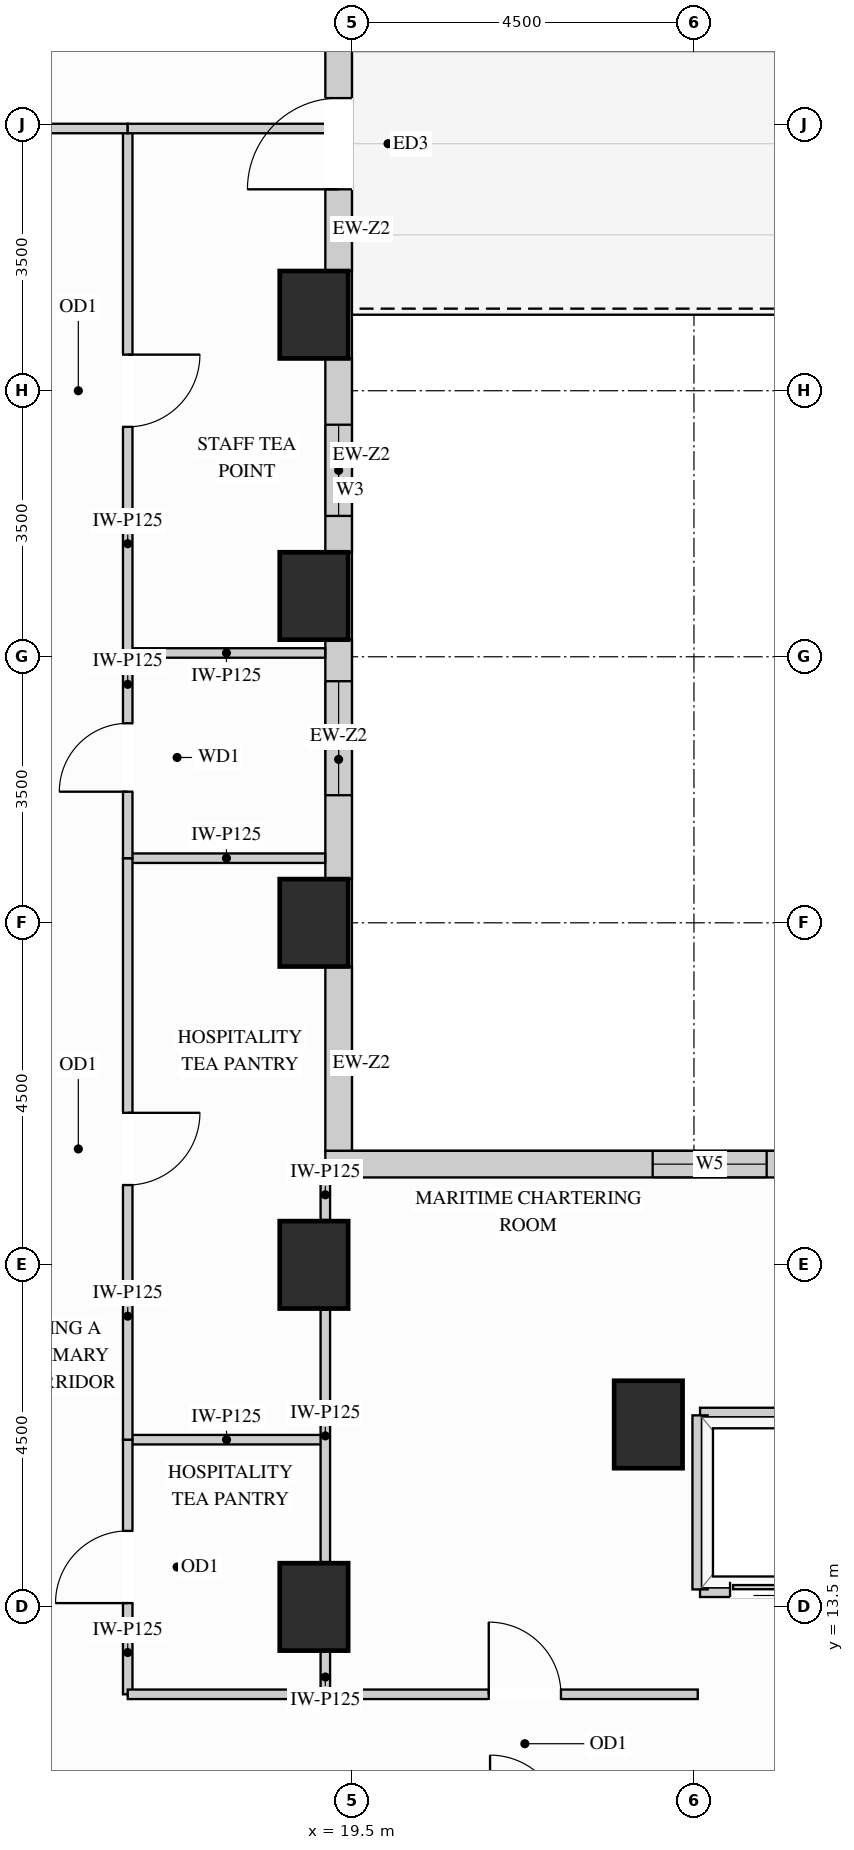
"""IFC4 building model, lengths in metres.
Left out: names, types, materials, properties, quantities, classifications, styles, units other than length and angle.
Written with IfcOpenShell. Run it as: python <this file> out.ifc"""

import sys

from ifc_helpers import new_model, si_unit, direction, frame, frame_2d, origin, origin_2d, place, context, subcontext, project, spatial, rectangle, extrude, source, transform, mapped, element, fill, save


model = new_model("IFC4")
c1 = context("Model", 3, precision=1e-05, world=origin(), true_north=direction((0.0, 1.0)))
c2 = subcontext(c1, "Body", "Model", "MODEL_VIEW")
j1 = project(units=[si_unit("LENGTHUNIT", "METRE"), si_unit("PLANEANGLEUNIT", "RADIAN")], contexts=[c1])
p1 = place(None, origin())
s1 = spatial("IfcSite", under=j1, at=p1, CompositionType="ELEMENT")
p2 = place(p1, origin())
s2 = spatial("IfcBuilding", under=s1, at=p2, CompositionType="ELEMENT")
p3 = place(p2, frame((0.0, 0.0, 99.0)))
s3 = spatial("IfcBuildingStorey", under=s2, at=p3, CompositionType="ELEMENT", Elevation=99.0)
m1 = source(origin(), c2, "Body", "SweptSolid", [
    extrude(rectangle(XDim=0.9, YDim=1.15, at=origin_2d()), origin(), (0.0, 0.0, 1.0), 3.38),
])
for number, where, z_axis, x_axis in (
    (1, (19.0, 13.5, 0.0), (0.0, 0.0, 1.0), (1.0, 0.0, 0.0)),
    (2, (19.0, 18.0, 0.0), (0.0, 0.0, 1.0), (1.0, 0.0, 0.0)),
    (3, (19.0, 22.5, 0.0), (0.0, 0.0, 1.0), (1.0, 0.0, 0.0)),
    (4, (19.0, 26.8, 0.0), (0.0, 0.0, 1.0), (1.0, 0.0, 0.0)),
    (5, (19.0, 30.5, 0.0), (0.0, 0.0, 1.0), (1.0, 0.0, 0.0)),
    (6, (23.4, 15.9, 0.0), (0.0, 0.0, 1.0), (1.0, 0.0, 0.0)),
):
    element("IfcColumn", number, at=place(p3, frame(where, z_axis=z_axis, x_axis=x_axis)), inside=s3, PredefinedType="COLUMN", context=c2, shape_type="MappedRepresentation", body=[
        mapped(m1, transform((0.0, 0.0, 0.0), x_axis=(1.0, 0.0, 0.0), y_axis=(0.0, 1.0, 0.0), z_axis=(0.0, 0.0, 1.0))),
    ])
m2 = source(origin(), c2, "Body", "SweptSolid", [
    extrude(rectangle(XDim=2.429, YDim=0.35, at=frame_2d((1.214, 0.0))), origin(), (0.0, 0.0, 1.0), 2.519),
])
p4 = place(p3, frame((19.325, 19.498, 0.0), z_axis=(0.0, 0.0, 1.0), x_axis=(0.0, 1.0, 0.0)))
e7 = element("IfcWall", 7, at=p4, inside=s3, PredefinedType="SOLIDWALL", context=c2, shape_type="MappedRepresentation", body=[
    mapped(m2, transform((0.0, 0.0, 0.0), x_axis=(1.0, 0.0, 0.0), y_axis=(0.0, 1.0, 0.0), z_axis=(0.0, 0.0, 1.0))),
])
p5 = place(p3, frame((19.325, 23.073, 0.0), z_axis=(0.0, 0.0, 1.0), x_axis=(0.0, 1.0, 0.0)))
e8 = element("IfcWall", 8, at=p5, inside=s3, PredefinedType="SOLIDWALL", context=c2, shape_type="SweptSolid", body=[
    extrude(rectangle(XDim=3.154, YDim=0.35, at=frame_2d((1.577, 0.0))), origin(), (0.0, 0.0, 1.0), 2.519),
])
p6 = place(p5, frame((1.105, 0.0, 0.78)))
e9 = element("IfcOpeningElement", 9, at=p6, cuts=e8, PredefinedType="OPENING", context=c2, shape_type="SweptSolid", body=[
    extrude(rectangle(XDim=1.5, YDim=1.559, at=frame_2d((0.75, 0.78))), frame((0.0, 0.185, 0.0), z_axis=(0.0, -1.0, 0.0), x_axis=(1.0, 0.0, 0.0)), (0.0, 0.0, 1.0), 0.37),
])
p7 = place(p3, frame((19.325, 27.373, 0.0), z_axis=(0.0, 0.0, 1.0), x_axis=(0.0, 1.0, 0.0)))
e10 = element("IfcWall", 10, at=p7, inside=s3, PredefinedType="SOLIDWALL", context=c2, shape_type="SweptSolid", body=[
    extrude(rectangle(XDim=2.554, YDim=0.35, at=frame_2d((1.277, 0.0))), origin(), (0.0, 0.0, 1.0), 2.519),
])
p8 = place(p7, frame((0.48, 0.0, 0.78)))
e11 = element("IfcOpeningElement", 11, at=p8, cuts=e10, PredefinedType="OPENING", context=c2, shape_type="SweptSolid", body=[
    extrude(rectangle(XDim=1.2, YDim=1.559, at=frame_2d((0.6, 0.78))), frame((0.0, 0.185, 0.0), z_axis=(0.0, -1.0, 0.0), x_axis=(1.0, 0.0, 0.0)), (0.0, 0.0, 1.0), 0.37),
])
p9 = place(p3, frame((19.325, 31.073, 0.0), z_axis=(0.0, 0.0, 1.0), x_axis=(0.0, 1.0, 0.0)))
e12 = element("IfcWall", 12, at=p9, inside=s3, PredefinedType="SOLIDWALL", context=c2, shape_type="SweptSolid", body=[
    extrude(rectangle(XDim=3.354, YDim=0.35, at=frame_2d((1.677, 0.0))), origin(), (0.0, 0.0, 1.0), 2.519),
])
p10 = place(p9, frame((1.077, 0.0, 0.0)))
e13 = element("IfcOpeningElement", 13, at=p10, cuts=e12, PredefinedType="OPENING", context=c2, shape_type="SweptSolid", body=[
    extrude(rectangle(XDim=1.2, YDim=2.15, at=frame_2d((0.6, 1.075))), frame((0.0, 0.185, 0.0), z_axis=(0.0, -1.0, 0.0), x_axis=(1.0, 0.0, 0.0)), (0.0, 0.0, 1.0), 0.37),
])
p11 = place(p3, frame((34.75, 19.325, 0.0), z_axis=(0.0, 0.0, 1.0), x_axis=(-1.0, 0.0, 0.0)))
e14 = element("IfcWall", 14, at=p11, inside=s3, PredefinedType="SOLIDWALL", context=c2, shape_type="SweptSolid", body=[
    extrude(rectangle(XDim=15.6, YDim=0.35, at=frame_2d((7.8, 0.0))), origin(), (0.0, 0.0, 1.0), 3.365),
])
p12 = place(p11, frame((4.307, 0.0, 0.78)))
e15 = element("IfcOpeningElement", 15, at=p12, cuts=e14, PredefinedType="OPENING", context=c2, shape_type="SweptSolid", body=[
    extrude(rectangle(XDim=1.5, YDim=2.0, at=frame_2d((0.75, 1.0))), frame((0.0, 0.185, 0.0), z_axis=(0.0, -1.0, 0.0), x_axis=(1.0, 0.0, 0.0)), (0.0, 0.0, 1.0), 0.37),
])
p13 = place(p11, frame((9.793, 0.0, 0.78)))
e16 = element("IfcOpeningElement", 16, at=p13, cuts=e14, PredefinedType="OPENING", context=c2, shape_type="SweptSolid", body=[
    extrude(rectangle(XDim=1.5, YDim=2.0, at=frame_2d((0.75, 1.0))), frame((0.0, 0.185, 0.0), z_axis=(0.0, -1.0, 0.0), x_axis=(1.0, 0.0, 0.0)), (0.0, 0.0, 1.0), 0.37),
])
m3 = source(origin(), c2, "Body", "SweptSolid", [
    extrude(rectangle(XDim=2.6, YDim=0.125, at=frame_2d((1.3, 0.0))), origin(), (0.0, 0.0, 1.0), 3.365),
])
p14 = place(p3, frame((16.55, 15.7, 0.0), z_axis=(0.0, 0.0, 1.0), x_axis=(1.0, 0.0, 0.0)))
e17 = element("IfcWall", 17, at=p14, inside=s3, PredefinedType="PARTITIONING", context=c2, shape_type="MappedRepresentation", body=[
    mapped(m3, transform((0.0, 0.0, 0.0), x_axis=(1.0, 0.0, 0.0), y_axis=(0.0, 1.0, 0.0), z_axis=(0.0, 0.0, 1.0))),
])
m4 = source(origin(), c2, "Body", "SweptSolid", [
    extrude(rectangle(XDim=2.598, YDim=0.125, at=frame_2d((1.299, 0.0))), origin(), (0.0, 0.0, 1.0), 3.365),
])
for number, where, z_axis, x_axis in (
    (18, (16.55, 23.35, 0.0), (0.0, 0.0, 1.0), (1.0, 0.0, 0.0)),
    (19, (16.55, 26.05, 0.0), (0.0, 0.0, 1.0), (1.0, 0.0, 0.0)),
):
    element("IfcWall", number, at=place(p3, frame(where, z_axis=z_axis, x_axis=x_axis)), inside=s3, PredefinedType="PARTITIONING", context=c2, shape_type="MappedRepresentation", body=[
        mapped(m4, transform((0.0, 0.0, 0.0), x_axis=(1.0, 0.0, 0.0), y_axis=(0.0, 1.0, 0.0), z_axis=(0.0, 0.0, 1.0))),
    ])
m5 = source(origin(), c2, "Body", "SweptSolid", [
    extrude(rectangle(XDim=0.56, YDim=0.125, at=frame_2d((0.28, 0.0))), origin(), (0.0, 0.0, 1.0), 2.677),
])
p15 = place(p3, frame((19.15, 12.35, 0.0), z_axis=(0.0, 0.0, 1.0), x_axis=(0.0, 1.0, 0.0)))
e20 = element("IfcWall", 20, at=p15, inside=s3, PredefinedType="PARTITIONING", context=c2, shape_type="MappedRepresentation", body=[
    mapped(m5, transform((0.0, 0.0, 0.0), x_axis=(1.0, 0.0, 0.0), y_axis=(0.0, 1.0, 0.0), z_axis=(0.0, 0.0, 1.0))),
])
m6 = source(origin(), c2, "Body", "SweptSolid", [
    extrude(rectangle(XDim=3.32, YDim=0.125, at=frame_2d((1.66, 0.0))), origin(), (0.0, 0.0, 1.0), 2.677),
])
p16 = place(p3, frame((19.15, 14.09, 0.0), z_axis=(0.0, 0.0, 1.0), x_axis=(0.0, 1.0, 0.0)))
e21 = element("IfcWall", 21, at=p16, inside=s3, PredefinedType="PARTITIONING", context=c2, shape_type="MappedRepresentation", body=[
    mapped(m6, transform((0.0, 0.0, 0.0), x_axis=(1.0, 0.0, 0.0), y_axis=(0.0, 1.0, 0.0), z_axis=(0.0, 0.0, 1.0))),
])
m7 = source(origin(), c2, "Body", "SweptSolid", [
    extrude(rectangle(XDim=0.558, YDim=0.125, at=frame_2d((0.279, 0.0))), origin(), (0.0, 0.0, 1.0), 2.519),
])
p17 = place(p3, frame((19.15, 18.59, 0.0), z_axis=(0.0, 0.0, 1.0), x_axis=(0.0, 1.0, 0.0)))
e22 = element("IfcWall", 22, at=p17, inside=s3, PredefinedType="PARTITIONING", context=c2, shape_type="MappedRepresentation", body=[
    mapped(m7, transform((0.0, 0.0, 0.0), x_axis=(1.0, 0.0, 0.0), y_axis=(0.0, 1.0, 0.0), z_axis=(0.0, 0.0, 1.0))),
])
p18 = place(p3, frame((16.55, 12.35, 0.0), z_axis=(0.0, 0.0, 1.0), x_axis=(0.0, 1.0, 0.0)))
e23 = element("IfcWall", 23, at=p18, inside=s3, PredefinedType="PARTITIONING", context=c2, shape_type="SweptSolid", body=[
    extrude(rectangle(XDim=3.35, YDim=0.125, at=frame_2d((1.675, 0.0))), origin(), (0.0, 0.0, 1.0), 3.365),
])
p19 = place(p18, frame((1.2, 0.0, 0.0)))
e24 = element("IfcOpeningElement", 24, at=p19, cuts=e23, PredefinedType="OPENING", context=c2, shape_type="SweptSolid", body=[
    extrude(rectangle(XDim=0.95, YDim=2.15, at=frame_2d((0.475, 1.075))), frame((0.0, 0.073, 0.0), z_axis=(0.0, -1.0, 0.0), x_axis=(1.0, 0.0, 0.0)), (0.0, 0.0, 1.0), 0.145),
])
p20 = place(p3, frame((16.55, 15.7, 0.0), z_axis=(0.0, 0.0, 1.0), x_axis=(0.0, 1.0, 0.0)))
e25 = element("IfcWall", 25, at=p20, inside=s3, PredefinedType="PARTITIONING", context=c2, shape_type="SweptSolid", body=[
    extrude(rectangle(XDim=7.65, YDim=0.125, at=frame_2d((3.825, 0.0))), origin(), (0.0, 0.0, 1.0), 3.365),
])
p21 = place(p20, frame((3.35, 0.0, 0.0)))
e26 = element("IfcOpeningElement", 26, at=p21, cuts=e25, PredefinedType="OPENING", context=c2, shape_type="SweptSolid", body=[
    extrude(rectangle(XDim=0.95, YDim=2.15, at=frame_2d((0.475, 1.075))), frame((0.0, 0.073, 0.0), z_axis=(0.0, -1.0, 0.0), x_axis=(1.0, 0.0, 0.0)), (0.0, 0.0, 1.0), 0.145),
])
p22 = place(p3, frame((16.55, 26.05, 0.0), z_axis=(0.0, 0.0, 1.0), x_axis=(0.0, 1.0, 0.0)))
e27 = element("IfcWall", 27, at=p22, inside=s3, PredefinedType="PARTITIONING", context=c2, shape_type="SweptSolid", body=[
    extrude(rectangle(XDim=6.9, YDim=0.125, at=frame_2d((3.45, 0.0))), origin(), (0.0, 0.0, 1.0), 3.365),
])
p23 = place(p22, frame((2.975, 0.0, 0.0)))
e28 = element("IfcOpeningElement", 28, at=p23, cuts=e27, PredefinedType="OPENING", context=c2, shape_type="SweptSolid", body=[
    extrude(rectangle(XDim=0.95, YDim=2.15, at=frame_2d((0.475, 1.075))), frame((0.0, 0.073, 0.0), z_axis=(0.0, -1.0, 0.0), x_axis=(1.0, 0.0, 0.0)), (0.0, 0.0, 1.0), 0.145),
])
p24 = place(p3, frame((16.55, 23.35, 0.0), z_axis=(0.0, 0.0, 1.0), x_axis=(0.0, 1.0, 0.0)))
e29 = element("IfcWall", 29, at=p24, inside=s3, PredefinedType="PARTITIONING", context=c2, shape_type="SweptSolid", body=[
    extrude(rectangle(XDim=2.7, YDim=0.125, at=frame_2d((1.35, 0.0))), origin(), (0.0, 0.0, 1.0), 3.365),
])
p25 = place(p24, frame((0.875, 0.0, 0.0)))
e30 = element("IfcOpeningElement", 30, at=p25, cuts=e29, PredefinedType="OPENING", context=c2, shape_type="SweptSolid", body=[
    extrude(rectangle(XDim=0.9, YDim=2.15, at=frame_2d((0.45, 1.075))), frame((0.0, 0.073, 0.0), z_axis=(0.0, -1.0, 0.0), x_axis=(1.0, 0.0, 0.0)), (0.0, 0.0, 1.0), 0.145),
])
p26 = place(p3, frame((2.45, 32.95, 0.0), z_axis=(0.0, 0.0, 1.0), x_axis=(1.0, 0.0, 0.0)))
e31 = element("IfcWall", 31, at=p26, inside=s3, PredefinedType="PARTITIONING", context=c2, shape_type="SweptSolid", body=[
    extrude(rectangle(XDim=14.1, YDim=0.125, at=frame_2d((7.05, 0.0))), origin(), (0.0, 0.0, 1.0), 3.365),
])
p27 = place(p26, frame((6.575, 0.0, 0.0)))
e32 = element("IfcOpeningElement", 32, at=p27, cuts=e31, PredefinedType="OPENING", context=c2, shape_type="SweptSolid", body=[
    extrude(rectangle(XDim=0.95, YDim=2.15, at=frame_2d((0.475, 1.075))), frame((0.0, 0.073, 0.0), z_axis=(0.0, -1.0, 0.0), x_axis=(1.0, 0.0, 0.0)), (0.0, 0.0, 1.0), 0.145),
])
p28 = place(p3, frame((16.55, 32.95, 0.0), z_axis=(0.0, 0.0, 1.0), x_axis=(1.0, 0.0, 0.0)))
e33 = element("IfcWall", 33, at=p28, inside=s3, PredefinedType="PARTITIONING", context=c2, shape_type="MappedRepresentation", body=[
    mapped(m4, transform((0.0, 0.0, 0.0), x_axis=(1.0, 0.0, 0.0), y_axis=(0.0, 1.0, 0.0), z_axis=(0.0, 0.0, 1.0))),
])
m8 = source(origin(), c2, "Body", "SweptSolid", [
    extrude(rectangle(XDim=2.95, YDim=0.125, at=frame_2d((1.475, 0.0))), origin(), (0.0, 0.0, 1.0), 3.365),
])
p29 = place(p3, frame((16.55, 12.35, 0.0), z_axis=(0.0, 0.0, 1.0), x_axis=(1.0, 0.0, 0.0)))
e34 = element("IfcWall", 34, at=p29, inside=s3, PredefinedType="PARTITIONING", context=c2, shape_type="MappedRepresentation", body=[
    mapped(m8, transform((0.0, 0.0, 0.0), x_axis=(1.0, 0.0, 0.0), y_axis=(0.0, 1.0, 0.0), z_axis=(0.0, 0.0, 1.0))),
])
p30 = place(p3, frame((19.5, 12.35, 0.0), z_axis=(0.0, 0.0, 1.0), x_axis=(1.0, 0.0, 0.0)))
e35 = element("IfcWall", 35, at=p30, inside=s3, PredefinedType="PARTITIONING", context=c2, shape_type="SweptSolid", body=[
    extrude(rectangle(XDim=4.55, YDim=0.125, at=frame_2d((2.275, 0.0))), origin(), (0.0, 0.0, 1.0), 3.365),
])
p31 = place(p30, frame((1.8, 0.0, 0.0)))
e36 = element("IfcOpeningElement", 36, at=p31, cuts=e35, PredefinedType="OPENING", context=c2, shape_type="SweptSolid", body=[
    extrude(rectangle(XDim=0.95, YDim=2.15, at=frame_2d((0.475, 1.075))), frame((0.0, 0.073, 0.0), z_axis=(0.0, -1.0, 0.0), x_axis=(1.0, 0.0, 0.0)), (0.0, 0.0, 1.0), 0.145),
])
m9 = source(origin(), c2, "Body", "SweptSolid", [
    extrude(rectangle(XDim=1.89, YDim=0.2, at=frame_2d((0.945, 0.0))), origin(), (0.0, 0.0, 1.0), 2.677),
])
p32 = place(p3, frame((24.08, 16.02, 0.0), z_axis=(0.0, 0.0, 1.0), x_axis=(1.0, 0.0, 0.0)))
e37 = element("IfcWall", 37, at=p32, inside=s3, PredefinedType="PARTITIONING", context=c2, shape_type="MappedRepresentation", body=[
    mapped(m9, transform((0.0, 0.0, 0.0), x_axis=(1.0, 0.0, 0.0), y_axis=(0.0, 1.0, 0.0), z_axis=(0.0, 0.0, 1.0))),
])
p33 = place(p3, frame((24.08, 13.73, 0.0), z_axis=(0.0, 0.0, 1.0), x_axis=(1.0, 0.0, 0.0)))
e38 = element("IfcWall", 38, at=p33, inside=s3, PredefinedType="PARTITIONING", context=c2, shape_type="SweptSolid", body=[
    extrude(rectangle(XDim=1.89, YDim=0.2, at=frame_2d((0.945, 0.0))), origin(), (0.0, 0.0, 1.0), 2.446),
])
p34 = place(p33, frame((0.395, 0.0, 0.0)))
e39 = element("IfcOpeningElement", 39, at=p34, cuts=e38, PredefinedType="OPENING", context=c2, shape_type="SweptSolid", body=[
    extrude(rectangle(XDim=1.1, YDim=2.2, at=frame_2d((0.55, 1.1))), frame((0.0, 0.11, 0.0), z_axis=(0.0, -1.0, 0.0), x_axis=(1.0, 0.0, 0.0)), (0.0, 0.0, 1.0), 0.22),
])
m10 = source(origin(), c2, "Body", "SweptSolid", [
    extrude(rectangle(XDim=2.29, YDim=0.2, at=frame_2d((1.145, 0.0))), origin(), (0.0, 0.0, 1.0), 3.365),
])
p35 = place(p3, frame((24.08, 13.73, 0.0), z_axis=(0.0, 0.0, 1.0), x_axis=(0.0, 1.0, 0.0)))
e40 = element("IfcWall", 40, at=p35, inside=s3, PredefinedType="PARTITIONING", context=c2, shape_type="MappedRepresentation", body=[
    mapped(m10, transform((0.0, 0.0, 0.0), x_axis=(1.0, 0.0, 0.0), y_axis=(0.0, 1.0, 0.0), z_axis=(0.0, 0.0, 1.0))),
])
m11 = source(origin(), c2, "Body", "SweptSolid", [
    extrude(rectangle(XDim=1.2, YDim=2.15, at=frame_2d((0.6, 1.075))), frame((0.0, 0.025, 0.0), z_axis=(0.0, -1.0, 0.0), x_axis=(1.0, 0.0, 0.0)), (0.0, 0.0, 1.0), 0.05),
])
p36 = place(p10, frame((1.2, 0.0, 0.0), z_axis=(0.0, 0.0, 1.0), x_axis=(-1.0, 0.0, 0.0)))
e41 = element("IfcDoor", 41, at=p36, inside=s3, OperationType="SINGLE_SWING_LEFT", PredefinedType="DOOR", context=c2, shape_type="MappedRepresentation", body=[
    mapped(m11, transform((0.0, 0.0, 0.0), x_axis=(1.0, 0.0, 0.0), y_axis=(0.0, 1.0, 0.0), z_axis=(0.0, 0.0, 1.0))),
])
fill(e13, e41)
m12 = source(origin(), c2, "Body", "SweptSolid", [
    extrude(rectangle(XDim=1.1, YDim=2.2, at=frame_2d((0.55, 1.1))), frame((0.0, 0.025, 0.0), z_axis=(0.0, -1.0, 0.0), x_axis=(1.0, 0.0, 0.0)), (0.0, 0.0, 1.0), 0.05),
])
p37 = place(p34, origin())
e42 = element("IfcDoor", 42, at=p37, inside=s3, OperationType="SLIDING_TO_LEFT", PredefinedType="DOOR", context=c2, shape_type="MappedRepresentation", body=[
    mapped(m12, transform((0.0, 0.0, 0.0), x_axis=(1.0, 0.0, 0.0), y_axis=(0.0, 1.0, 0.0), z_axis=(0.0, 0.0, 1.0))),
])
fill(e39, e42)
m13 = source(origin(), c2, "Body", "SweptSolid", [
    extrude(rectangle(XDim=0.95, YDim=2.15, at=frame_2d((0.475, 1.075))), frame((0.0, 0.025, 0.0), z_axis=(0.0, -1.0, 0.0), x_axis=(1.0, 0.0, 0.0)), (0.0, 0.0, 1.0), 0.05),
])
p38 = place(p19, origin())
e43 = element("IfcDoor", 43, at=p38, inside=s3, OperationType="SINGLE_SWING_LEFT", PredefinedType="DOOR", context=c2, shape_type="MappedRepresentation", body=[
    mapped(m13, transform((0.0, 0.0, 0.0), x_axis=(1.0, 0.0, 0.0), y_axis=(0.0, 1.0, 0.0), z_axis=(0.0, 0.0, 1.0))),
])
fill(e24, e43)
p39 = place(p21, origin())
e44 = element("IfcDoor", 44, at=p39, inside=s3, OperationType="SINGLE_SWING_RIGHT", PredefinedType="DOOR", context=c2, shape_type="MappedRepresentation", body=[
    mapped(m13, transform((0.0, 0.0, 0.0), x_axis=(1.0, 0.0, 0.0), y_axis=(0.0, 1.0, 0.0), z_axis=(0.0, 0.0, 1.0))),
])
fill(e26, e44)
p40 = place(p23, origin())
e45 = element("IfcDoor", 45, at=p40, inside=s3, OperationType="SINGLE_SWING_RIGHT", PredefinedType="DOOR", context=c2, shape_type="MappedRepresentation", body=[
    mapped(m13, transform((0.0, 0.0, 0.0), x_axis=(1.0, 0.0, 0.0), y_axis=(0.0, 1.0, 0.0), z_axis=(0.0, 0.0, 1.0))),
])
fill(e28, e45)
p41 = place(p31, origin())
e46 = element("IfcDoor", 46, at=p41, inside=s3, OperationType="SINGLE_SWING_LEFT", PredefinedType="DOOR", context=c2, shape_type="MappedRepresentation", body=[
    mapped(m13, transform((0.0, 0.0, 0.0), x_axis=(1.0, 0.0, 0.0), y_axis=(0.0, 1.0, 0.0), z_axis=(0.0, 0.0, 1.0))),
])
fill(e36, e46)
m14 = source(origin(), c2, "Body", "SweptSolid", [
    extrude(rectangle(XDim=0.9, YDim=2.15, at=frame_2d((0.45, 1.075))), frame((0.0, 0.025, 0.0), z_axis=(0.0, -1.0, 0.0), x_axis=(1.0, 0.0, 0.0)), (0.0, 0.0, 1.0), 0.05),
])
p42 = place(p25, origin())
e47 = element("IfcDoor", 47, at=p42, inside=s3, OperationType="SINGLE_SWING_LEFT", PredefinedType="DOOR", context=c2, shape_type="MappedRepresentation", body=[
    mapped(m14, transform((0.0, 0.0, 0.0), x_axis=(1.0, 0.0, 0.0), y_axis=(0.0, 1.0, 0.0), z_axis=(0.0, 0.0, 1.0))),
])
fill(e30, e47)
m15 = source(origin(), c2, "Body", "SweptSolid", [
    extrude(rectangle(XDim=1.2, YDim=1.559, at=frame_2d((0.6, 0.78))), frame((0.0, 0.03, 0.0), z_axis=(0.0, -1.0, 0.0), x_axis=(1.0, 0.0, 0.0)), (0.0, 0.0, 1.0), 0.06),
])
p43 = place(p8, origin())
e48 = element("IfcWindow", 48, at=p43, inside=s3, PartitioningType="SINGLE_PANEL", PredefinedType="WINDOW", context=c2, shape_type="MappedRepresentation", body=[
    mapped(m15, transform((0.0, 0.0, 0.0), x_axis=(1.0, 0.0, 0.0), y_axis=(0.0, 1.0, 0.0), z_axis=(0.0, 0.0, 1.0))),
])
fill(e11, e48)
m16 = source(origin(), c2, "Body", "SweptSolid", [
    extrude(rectangle(XDim=1.5, YDim=1.559, at=frame_2d((0.75, 0.78))), frame((0.0, 0.03, 0.0), z_axis=(0.0, -1.0, 0.0), x_axis=(1.0, 0.0, 0.0)), (0.0, 0.0, 1.0), 0.06),
])
p44 = place(p6, origin())
e49 = element("IfcWindow", 49, at=p44, inside=s3, PartitioningType="SINGLE_PANEL", PredefinedType="WINDOW", context=c2, shape_type="MappedRepresentation", body=[
    mapped(m16, transform((0.0, 0.0, 0.0), x_axis=(1.0, 0.0, 0.0), y_axis=(0.0, 1.0, 0.0), z_axis=(0.0, 0.0, 1.0))),
])
fill(e9, e49)
m17 = source(origin(), c2, "Body", "SweptSolid", [
    extrude(rectangle(XDim=1.5, YDim=2.0, at=frame_2d((0.75, 1.0))), frame((0.0, 0.03, 0.0), z_axis=(0.0, -1.0, 0.0), x_axis=(1.0, 0.0, 0.0)), (0.0, 0.0, 1.0), 0.06),
])
p45 = place(p13, origin())
e50 = element("IfcWindow", 50, at=p45, inside=s3, PartitioningType="SINGLE_PANEL", PredefinedType="WINDOW", context=c2, shape_type="MappedRepresentation", body=[
    mapped(m17, transform((0.0, 0.0, 0.0), x_axis=(1.0, 0.0, 0.0), y_axis=(0.0, 1.0, 0.0), z_axis=(0.0, 0.0, 1.0))),
])
fill(e16, e50)
save(model, sys.argv[1])
